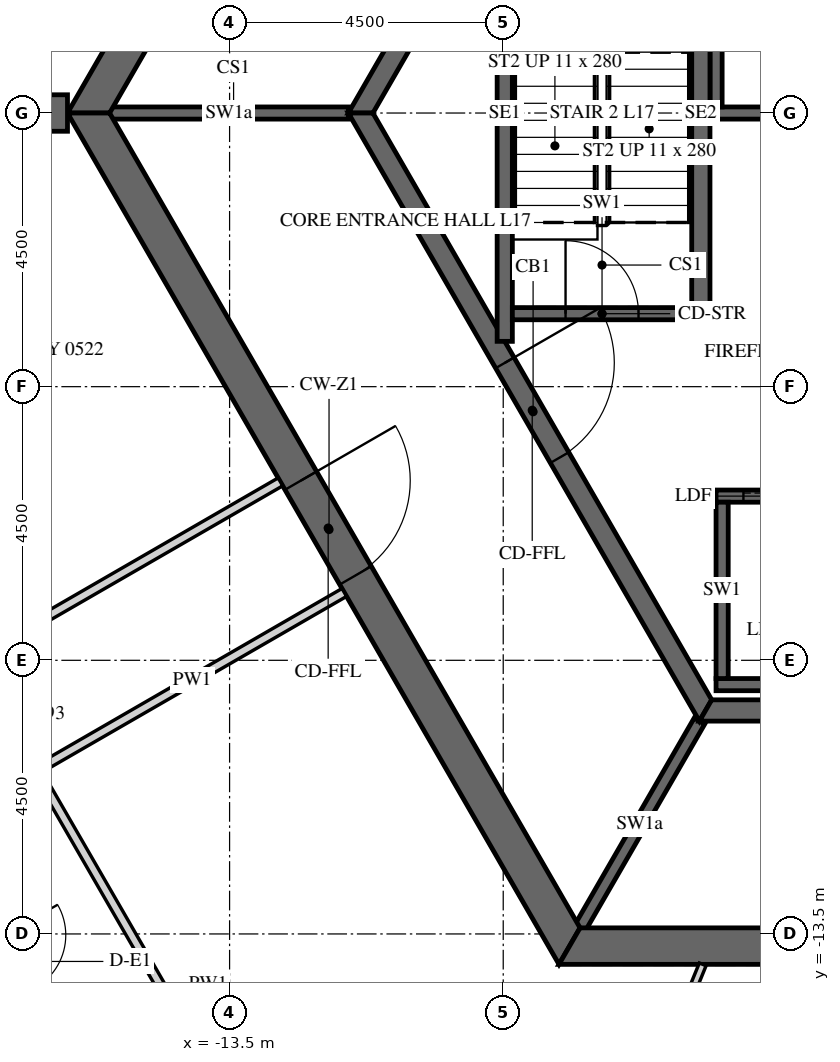
"""IFC4 building model, lengths in metres.
Left out: names, types, materials, properties, quantities, classifications, styles, units other than length and angle.
Written with IfcOpenShell. Run it as: python <this file> out.ifc"""

import sys

from ifc_helpers import new_model, si_unit, direction, frame, frame_2d, origin, place, context, subcontext, project, spatial, polyline, rectangle, outline, extrude, element, fill, save


model = new_model("IFC4")
c1 = context("Model", 3, precision=1e-05, world=origin(), true_north=direction((0.0, 1.0)))
c2 = subcontext(c1, "Body", "Model", "MODEL_VIEW")
j1 = project(units=[si_unit("LENGTHUNIT", "METRE"), si_unit("PLANEANGLEUNIT", "RADIAN")], contexts=[c1])
p1 = place(None, origin())
s1 = spatial("IfcSite", under=j1, at=p1, CompositionType="ELEMENT")
p2 = place(p1, origin())
s2 = spatial("IfcBuilding", under=s1, at=p2, CompositionType="ELEMENT")
p3 = place(p2, frame((0.0, 0.0, 80.4)))
s3 = spatial("IfcBuildingStorey", under=s2, at=p3, CompositionType="ELEMENT", Elevation=80.4)
p4 = place(p3, frame((-7.91, 13.7, -0.15), z_axis=(0.0, 0.0, 1.0), x_axis=(-0.499999880136, -0.866025472988, 0.0)))
e1 = element("IfcWall", 1, at=p4, inside=s3, PredefinedType="SHEAR", context=c2, shape_type="SweptSolid", body=[
    extrude(outline(polyline([(-0.173, -0.3), (15.993, -0.3), (15.646, 0.3), (0.173, 0.3), (-0.173, -0.3)])), origin(), (0.0, 0.0, 1.0), 3.9),
])
p5 = place(p4, frame((7.039, 0.0, 0.15)))
e2 = element("IfcOpeningElement", 2, at=p5, cuts=e1, PredefinedType="OPENING", context=c2, shape_type="SweptSolid", body=[
    extrude(rectangle(XDim=1.8, YDim=2.4, at=frame_2d((0.9, 1.2))), frame((0.0, 0.31, 0.0), z_axis=(0.0, -1.0, 0.0), x_axis=(1.0, 0.0, 0.0)), (0.0, 0.0, 1.0), 0.62),
])
p6 = place(p3, frame((-15.819, 0.0, -0.15), z_axis=(0.0, 0.0, 1.0), x_axis=(0.499999880136, -0.866025472988, 0.0)))
e3 = element("IfcWall", 3, at=p6, inside=s3, PredefinedType="SHEAR", context=c2, shape_type="SweptSolid", body=[
    extrude(outline(polyline([(-0.173, -0.3), (15.993, -0.3), (15.646, 0.3), (0.173, 0.3), (-0.173, -0.3)])), origin(), (0.0, 0.0, 1.0), 3.9),
])
p7 = place(p6, frame((6.981, 0.0, 0.15)))
e4 = element("IfcOpeningElement", 4, at=p7, cuts=e3, PredefinedType="OPENING", context=c2, shape_type="SweptSolid", body=[
    extrude(rectangle(XDim=1.8, YDim=2.4, at=frame_2d((0.9, 1.2))), frame((0.0, 0.31, 0.0), z_axis=(0.0, -1.0, 0.0), x_axis=(1.0, 0.0, 0.0)), (0.0, 0.0, 1.0), 0.62),
])
p8 = place(p3, frame((-7.91, -13.7, -0.15), z_axis=(0.0, 0.0, 1.0), x_axis=(1.0, 0.0, 0.0)))
e5 = element("IfcWall", 5, at=p8, inside=s3, PredefinedType="SHEAR", context=c2, shape_type="SweptSolid", body=[
    extrude(outline(polyline([(-0.173, -0.3), (15.993, -0.3), (15.646, 0.3), (0.173, 0.3), (-0.173, -0.3)])), origin(), (0.0, 0.0, 1.0), 3.9),
])
p9 = place(p8, frame((7.31, 0.0, 0.15)))
e6 = element("IfcOpeningElement", 6, at=p9, cuts=e5, PredefinedType="OPENING", context=c2, shape_type="SweptSolid", body=[
    extrude(rectangle(XDim=1.2, YDim=2.4, at=frame_2d((0.6, 1.2))), frame((0.0, 0.31, 0.0), z_axis=(0.0, -1.0, 0.0), x_axis=(1.0, 0.0, 0.0)), (0.0, 0.0, 1.0), 0.62),
])
p10 = place(p3, frame((-16.166, 0.0, -0.15), z_axis=(0.0, 0.0, 1.0), x_axis=(-1.0, 0.0, 0.0)))
e7 = element("IfcWall", 7, at=p10, inside=s3, PredefinedType="SHEAR", context=c2, shape_type="SweptSolid", body=[
    extrude(rectangle(XDim=16.509, YDim=0.6, at=frame_2d((8.254, 0.0))), origin(), (0.0, 0.0, 1.0), 3.9),
])
p11 = place(p10, frame((7.354, 0.0, 0.15)))
e8 = element("IfcOpeningElement", 8, at=p11, cuts=e7, PredefinedType="OPENING", context=c2, shape_type="SweptSolid", body=[
    extrude(rectangle(XDim=1.8, YDim=2.4, at=frame_2d((0.9, 1.2))), frame((0.0, 0.31, 0.0), z_axis=(0.0, -1.0, 0.0), x_axis=(1.0, 0.0, 0.0)), (0.0, 0.0, 1.0), 0.62),
])
p12 = place(p3, frame((-5.673, 9.825, -0.15), z_axis=(0.0, 0.0, 1.0), x_axis=(-0.499995046907, -0.866028263435, 0.0)))
e9 = element("IfcWall", 9, at=p12, inside=s3, PredefinedType="SHEAR", context=c2, shape_type="SweptSolid", body=[
    extrude(outline(polyline([(-0.101, -0.175), (11.446, -0.175), (11.244, 0.175), (0.101, 0.175), (-0.101, -0.175)])), origin(), (0.0, 0.0, 1.0), 3.9),
])
p13 = place(p12, frame((4.801, 0.0, 0.15)))
e10 = element("IfcOpeningElement", 10, at=p13, cuts=e9, PredefinedType="OPENING", context=c2, shape_type="SweptSolid", body=[
    extrude(rectangle(XDim=1.8, YDim=2.4, at=frame_2d((0.9, 1.2))), frame((0.0, 0.185, 0.0), z_axis=(0.0, -1.0, 0.0), x_axis=(1.0, 0.0, 0.0)), (0.0, 0.0, 1.0), 0.37),
])
p14 = place(p3, frame((-11.345, 0.0, -0.15), z_axis=(0.0, 0.0, 1.0), x_axis=(0.499995046907, -0.866028263435, 0.0)))
e11 = element("IfcWall", 11, at=p14, inside=s3, PredefinedType="SHEAR", context=c2, shape_type="SweptSolid", body=[
    extrude(outline(polyline([(-0.101, -0.175), (11.446, -0.175), (11.244, 0.175), (0.101, 0.175), (-0.101, -0.175)])), origin(), (0.0, 0.0, 1.0), 3.9),
])
p15 = place(p14, frame((4.744, 0.0, 0.15)))
e12 = element("IfcOpeningElement", 12, at=p15, cuts=e11, PredefinedType="OPENING", context=c2, shape_type="SweptSolid", body=[
    extrude(rectangle(XDim=1.8, YDim=2.4, at=frame_2d((0.9, 1.2))), frame((0.0, 0.185, 0.0), z_axis=(0.0, -1.0, 0.0), x_axis=(1.0, 0.0, 0.0)), (0.0, 0.0, 1.0), 0.37),
])
p16 = place(p3, frame((-5.673, -9.825, -0.15), z_axis=(0.0, 0.0, 1.0), x_axis=(1.0, 0.0, 0.0)))
e13 = element("IfcWall", 13, at=p16, inside=s3, PredefinedType="SHEAR", context=c2, shape_type="SweptSolid", body=[
    extrude(outline(polyline([(-0.101, -0.175), (11.446, -0.175), (11.244, 0.175), (0.101, 0.175), (-0.101, -0.175)])), origin(), (0.0, 0.0, 1.0), 3.9),
])
p17 = place(p3, frame((-5.6, 0.0, -0.25), z_axis=(0.0, 0.0, 1.0), x_axis=(1.0, 0.0, 0.0)))
e14 = element("IfcWall", 14, at=p17, inside=s3, PredefinedType="SHEAR", context=c2, shape_type="SweptSolid", body=[
    extrude(rectangle(XDim=11.2, YDim=0.2, at=frame_2d((5.6, 0.0))), origin(), (0.0, 0.0, 1.0), 3.9),
])
p18 = place(p3, frame((-5.5, 0.1, -0.25), z_axis=(0.0, 0.0, 1.0), x_axis=(0.0, 1.0, 0.0)))
e15 = element("IfcWall", 15, at=p18, inside=s3, PredefinedType="SHEAR", context=c2, shape_type="SweptSolid", body=[
    extrude(rectangle(XDim=3.1, YDim=0.2, at=frame_2d((1.55, 0.0))), origin(), (0.0, 0.0, 1.0), 3.9),
])
p19 = place(p3, frame((-5.5, -6.3, -0.25), z_axis=(0.0, 0.0, 1.0), x_axis=(1.0, 0.0, 0.0)))
e16 = element("IfcWall", 16, at=p19, inside=s3, PredefinedType="SHEAR", context=c2, shape_type="SweptSolid", body=[
    extrude(rectangle(XDim=9.2, YDim=0.2, at=frame_2d((4.6, 0.0))), origin(), (0.0, 0.0, 1.0), 3.9),
])
p20 = place(p19, frame((0.45, 0.0, 0.25)))
e17 = element("IfcOpeningElement", 17, at=p20, cuts=e16, PredefinedType="OPENING", context=c2, shape_type="SweptSolid", body=[
    extrude(rectangle(XDim=1.1, YDim=2.1, at=frame_2d((0.55, 1.05))), frame((0.0, 0.11, 0.0), z_axis=(0.0, -1.0, 0.0), x_axis=(1.0, 0.0, 0.0)), (0.0, 0.0, 1.0), 0.22),
])
p21 = place(p19, frame((2.25, 0.0, 0.25)))
e18 = element("IfcOpeningElement", 18, at=p21, cuts=e16, PredefinedType="OPENING", context=c2, shape_type="SweptSolid", body=[
    extrude(rectangle(XDim=1.1, YDim=2.1, at=frame_2d((0.55, 1.05))), frame((0.0, 0.11, 0.0), z_axis=(0.0, -1.0, 0.0), x_axis=(1.0, 0.0, 0.0)), (0.0, 0.0, 1.0), 0.22),
])
p22 = place(p19, frame((4.05, 0.0, 0.25)))
e19 = element("IfcOpeningElement", 19, at=p22, cuts=e16, PredefinedType="OPENING", context=c2, shape_type="SweptSolid", body=[
    extrude(rectangle(XDim=1.1, YDim=2.1, at=frame_2d((0.55, 1.05))), frame((0.0, 0.11, 0.0), z_axis=(0.0, -1.0, 0.0), x_axis=(1.0, 0.0, 0.0)), (0.0, 0.0, 1.0), 0.22),
])
p23 = place(p19, frame((5.85, 0.0, 0.25)))
e20 = element("IfcOpeningElement", 20, at=p23, cuts=e16, PredefinedType="OPENING", context=c2, shape_type="SweptSolid", body=[
    extrude(rectangle(XDim=1.1, YDim=2.1, at=frame_2d((0.55, 1.05))), frame((0.0, 0.11, 0.0), z_axis=(0.0, -1.0, 0.0), x_axis=(1.0, 0.0, 0.0)), (0.0, 0.0, 1.0), 0.22),
])
p24 = place(p19, frame((7.65, 0.0, 0.25)))
e21 = element("IfcOpeningElement", 21, at=p24, cuts=e16, PredefinedType="OPENING", context=c2, shape_type="SweptSolid", body=[
    extrude(rectangle(XDim=1.1, YDim=2.1, at=frame_2d((0.55, 1.05))), frame((0.0, 0.11, 0.0), z_axis=(0.0, -1.0, 0.0), x_axis=(1.0, 0.0, 0.0)), (0.0, 0.0, 1.0), 0.22),
])
p25 = place(p3, frame((-5.5, -9.4, -0.25), z_axis=(0.0, 0.0, 1.0), x_axis=(1.0, 0.0, 0.0)))
e22 = element("IfcWall", 22, at=p25, inside=s3, PredefinedType="SHEAR", context=c2, shape_type="SweptSolid", body=[
    extrude(rectangle(XDim=9.2, YDim=0.2, at=frame_2d((4.6, 0.0))), origin(), (0.0, 0.0, 1.0), 3.9),
])
p26 = place(p3, frame((-5.4, -9.3, -0.25), z_axis=(0.0, 0.0, 1.0), x_axis=(0.0, 1.0, 0.0)))
e23 = element("IfcWall", 23, at=p26, inside=s3, PredefinedType="SHEAR", context=c2, shape_type="SweptSolid", body=[
    extrude(rectangle(XDim=2.9, YDim=0.2, at=frame_2d((1.45, 0.0))), origin(), (0.0, 0.0, 1.0), 3.9),
])
p27 = place(p3, frame((-11.547, 0.0, -0.15), z_axis=(0.0, 0.0, 1.0), x_axis=(-1.0, 0.0, 0.0)))
e24 = element("IfcWall", 24, at=p27, inside=s3, PredefinedType="SHEAR", context=c2, shape_type="SweptSolid", body=[
    extrude(rectangle(XDim=3.926, YDim=0.2, at=frame_2d((1.963, 0.0))), origin(), (0.0, 0.0, 1.0), 3.9),
])
p28 = place(p3, frame((-5.773, -10.0, -0.15), z_axis=(0.0, 0.0, 1.0), x_axis=(-0.500038251005, -0.86600331843, 0.0)))
e25 = element("IfcWall", 25, at=p28, inside=s3, PredefinedType="SHEAR", context=c2, shape_type="SweptSolid", body=[
    extrude(rectangle(XDim=3.926, YDim=0.2, at=frame_2d((1.963, 0.0))), origin(), (0.0, 0.0, 1.0), 3.9),
])
p29 = place(p3, frame((-5.75, -3.4, -0.25), z_axis=(0.0, 0.0, 1.0), x_axis=(0.0, 1.0, 0.0)))
e26 = element("IfcWall", 26, at=p29, inside=s3, PredefinedType="SHEAR", context=c2, shape_type="SweptSolid", body=[
    extrude(rectangle(XDim=6.8, YDim=0.3, at=frame_2d((3.4, 0.0))), origin(), (0.0, 0.0, 1.0), 3.9),
])
p30 = place(p3, frame((-8.975, -3.755, -0.25), z_axis=(0.0, 0.0, 1.0), x_axis=(0.0, 1.0, 0.0)))
e27 = element("IfcWall", 27, at=p30, inside=s3, PredefinedType="SHEAR", context=c2, shape_type="SweptSolid", body=[
    extrude(rectangle(XDim=7.51, YDim=0.25, at=frame_2d((3.755, 0.0))), origin(), (0.0, 0.0, 1.0), 3.9),
])
p31 = place(p3, frame((-8.85, -3.3, -0.25), z_axis=(0.0, 0.0, 1.0), x_axis=(1.0, 0.0, 0.0)))
e28 = element("IfcWall", 28, at=p31, inside=s3, PredefinedType="SHEAR", context=c2, shape_type="SweptSolid", body=[
    extrude(rectangle(XDim=2.95, YDim=0.2, at=frame_2d((1.475, 0.0))), origin(), (0.0, 0.0, 1.0), 3.9),
])
p32 = place(p31, frame((0.875, 0.0, 0.25)))
e29 = element("IfcOpeningElement", 29, at=p32, cuts=e28, PredefinedType="OPENING", context=c2, shape_type="SweptSolid", body=[
    extrude(rectangle(XDim=1.2, YDim=2.4, at=frame_2d((0.6, 1.2))), frame((0.0, 0.11, 0.0), z_axis=(0.0, -1.0, 0.0), x_axis=(1.0, 0.0, 0.0)), (0.0, 0.0, 1.0), 0.22),
])
p33 = place(p3, frame((-23.743, -2.175, 0.0), z_axis=(0.0, 0.0, 1.0), x_axis=(0.499992353047, -0.86602981871, 0.0)))
e30 = element("IfcWall", 30, at=p33, inside=s3, PredefinedType="PARTITIONING", context=c2, shape_type="SweptSolid", body=[
    extrude(rectangle(XDim=23.516, YDim=0.15, at=frame_2d((11.758, 0.0))), origin(), (0.0, 0.0, 1.0), 2.988),
])
p34 = place(p33, frame((6.256, 0.0, 0.0)))
e31 = element("IfcOpeningElement", 31, at=p34, cuts=e30, PredefinedType="OPENING", context=c2, shape_type="SweptSolid", body=[
    extrude(rectangle(XDim=1.0, YDim=2.1, at=frame_2d((0.5, 1.05))), frame((0.0, 0.085, 0.0), z_axis=(0.0, -1.0, 0.0), x_axis=(1.0, 0.0, 0.0)), (0.0, 0.0, 1.0), 0.17),
])
p35 = place(p33, frame((13.099, 0.0, 0.0)))
e32 = element("IfcOpeningElement", 32, at=p35, cuts=e30, PredefinedType="OPENING", context=c2, shape_type="SweptSolid", body=[
    extrude(rectangle(XDim=1.0, YDim=2.1, at=frame_2d((0.5, 1.05))), frame((0.0, 0.085, 0.0), z_axis=(0.0, -1.0, 0.0), x_axis=(1.0, 0.0, 0.0)), (0.0, 0.0, 1.0), 0.17),
])
p36 = place(p33, frame((18.749, 0.0, 0.0)))
e33 = element("IfcOpeningElement", 33, at=p36, cuts=e30, PredefinedType="OPENING", context=c2, shape_type="SweptSolid", body=[
    extrude(rectangle(XDim=1.0, YDim=2.1, at=frame_2d((0.5, 1.05))), frame((0.0, 0.085, 0.0), z_axis=(0.0, -1.0, 0.0), x_axis=(1.0, 0.0, 0.0)), (0.0, 0.0, 1.0), 0.17),
])
p37 = place(p3, frame((-12.664, -6.066, 0.0), z_axis=(0.0, 0.0, 1.0), x_axis=(-0.866018092707, -0.500012662943, 0.0)))
e34 = element("IfcWall", 34, at=p37, inside=s3, PredefinedType="PARTITIONING", context=c2, shape_type="SweptSolid", body=[
    extrude(rectangle(XDim=5.85, YDim=0.15, at=frame_2d((2.925, 0.0))), origin(), (0.0, 0.0, 1.0), 2.988),
])
p38 = place(p3, frame((-11.031, -20.595, 0.0), z_axis=(0.0, 0.0, 1.0), x_axis=(-0.499987422378, 0.866032665356, 0.0)))
e35 = element("IfcWall", 35, at=p38, inside=s3, PredefinedType="PARTITIONING", context=c2, shape_type="SweptSolid", body=[
    extrude(rectangle(XDim=11.299, YDim=0.15, at=frame_2d((5.649, 0.0))), origin(), (0.0, 0.0, 1.0), 2.988),
])
p39 = place(p38, frame((5.199, 0.0, 0.0)))
e36 = element("IfcOpeningElement", 36, at=p39, cuts=e35, PredefinedType="OPENING", context=c2, shape_type="SweptSolid", body=[
    extrude(rectangle(XDim=0.9, YDim=2.1, at=frame_2d((0.45, 1.05))), frame((0.0, 0.085, 0.0), z_axis=(0.0, -1.0, 0.0), x_axis=(1.0, 0.0, 0.0)), (0.0, 0.0, 1.0), 0.17),
])
p40 = place(p3, frame((-16.615, -10.772, 0.0), z_axis=(0.0, 0.0, 1.0), x_axis=(0.866025774745, 0.499999357477, 0.0)))
e37 = element("IfcWall", 37, at=p40, inside=s3, PredefinedType="PARTITIONING", context=c2, shape_type="SweptSolid", body=[
    extrude(rectangle(XDim=5.775, YDim=0.15, at=frame_2d((2.887, 0.0))), origin(), (0.0, 0.0, 1.0), 2.988),
])
p41 = place(p3, frame((-5.719, -14.0, 0.0), z_axis=(0.0, 0.0, 1.0), x_axis=(-0.378193217714, -0.925726682166, 0.0)))
e38 = element("IfcWall", 38, at=p41, inside=s3, PredefinedType="PARTITIONING", context=c2, shape_type="SweptSolid", body=[
    extrude(rectangle(XDim=6.92, YDim=0.12, at=frame_2d((3.46, 0.0))), origin(), (0.0, 0.0, 1.0), 2.988),
])
p42 = place(p7, origin())
e39 = element("IfcDoor", 39, at=p42, inside=s3, OperationType="DOUBLE_DOOR_SINGLE_SWING", PredefinedType="DOOR", context=c2, shape_type="SweptSolid", body=[
    extrude(rectangle(XDim=1.8, YDim=2.4, at=frame_2d((0.9, 1.2))), frame((0.0, 0.025, 0.0), z_axis=(0.0, -1.0, 0.0), x_axis=(1.0, 0.0, 0.0)), (0.0, 0.0, 1.0), 0.05),
])
fill(e4, e39)
p43 = place(p15, origin())
e40 = element("IfcDoor", 40, at=p43, inside=s3, OperationType="DOUBLE_DOOR_SINGLE_SWING", PredefinedType="DOOR", context=c2, shape_type="SweptSolid", body=[
    extrude(rectangle(XDim=1.8, YDim=2.4, at=frame_2d((0.9, 1.2))), frame((0.0, 0.025, 0.0), z_axis=(0.0, -1.0, 0.0), x_axis=(1.0, 0.0, 0.0)), (0.0, 0.0, 1.0), 0.05),
])
fill(e12, e40)
p44 = place(p32, origin())
e41 = element("IfcDoor", 41, at=p44, inside=s3, OperationType="SINGLE_SWING_LEFT", PredefinedType="DOOR", context=c2, shape_type="SweptSolid", body=[
    extrude(rectangle(XDim=1.2, YDim=2.4, at=frame_2d((0.6, 1.2))), frame((0.0, 0.025, 0.0), z_axis=(0.0, -1.0, 0.0), x_axis=(1.0, 0.0, 0.0)), (0.0, 0.0, 1.0), 0.05),
])
fill(e29, e41)
p45 = place(p20, origin())
e42 = element("IfcDoor", 42, at=p45, inside=s3, OperationType="SLIDING_TO_LEFT", PredefinedType="DOOR", context=c2, shape_type="SweptSolid", body=[
    extrude(rectangle(XDim=1.1, YDim=2.1, at=frame_2d((0.55, 1.05))), frame((0.0, 0.025, 0.0), z_axis=(0.0, -1.0, 0.0), x_axis=(1.0, 0.0, 0.0)), (0.0, 0.0, 1.0), 0.05),
])
fill(e17, e42)
save(model, sys.argv[1])
